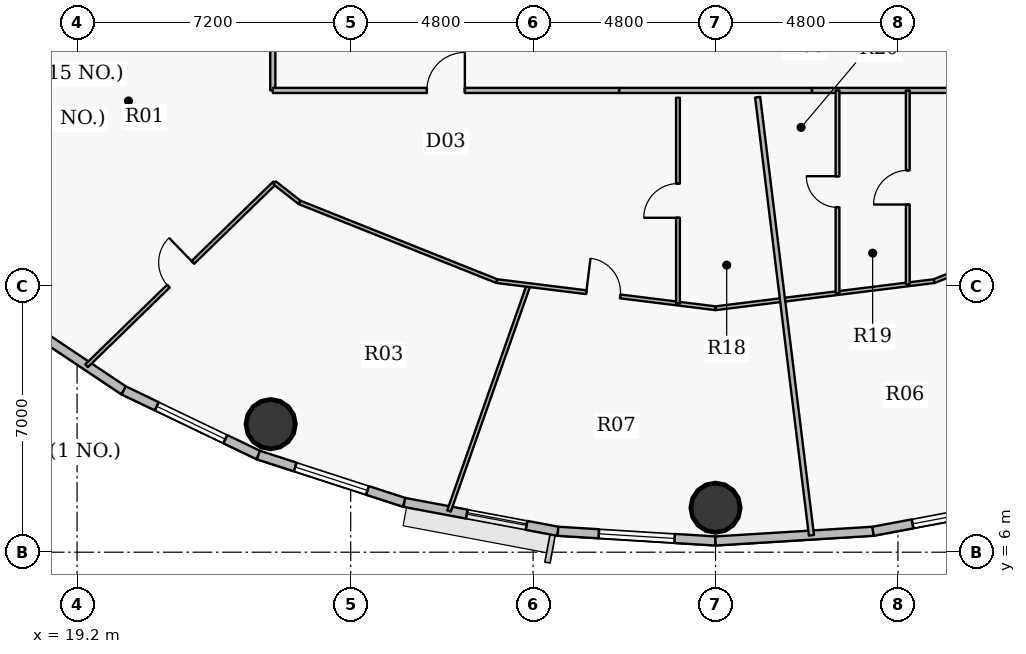
"""IFC4 building model, lengths in metres.
Left out: names, types, materials, properties, quantities, classifications, styles, units other than length and angle.
Written with IfcOpenShell. Run it as: python <this file> out.ifc"""

import sys

from ifc_helpers import new_model, si_unit, direction, frame, frame_2d, origin, origin_2d, place, context, subcontext, project, spatial, rectangle, hollow_circle, extrude, source, transform, mapped, element, fill, save


model = new_model("IFC4")
c1 = context("Model", 3, precision=1e-05, world=origin(), true_north=direction((0.0, 1.0)))
c2 = subcontext(c1, "Body", "Model", "MODEL_VIEW")
j1 = project(units=[si_unit("LENGTHUNIT", "METRE"), si_unit("PLANEANGLEUNIT", "RADIAN")], contexts=[c1])
p1 = place(None, origin())
s1 = spatial("IfcSite", under=j1, at=p1, CompositionType="ELEMENT")
p2 = place(p1, origin())
s2 = spatial("IfcBuilding", under=s1, at=p2, CompositionType="ELEMENT")
p3 = place(p2, frame((0.0, 0.0, 167.4)))
s3 = spatial("IfcBuildingStorey", under=s2, at=p3, CompositionType="ELEMENT", Elevation=167.4)
for number, where, z_axis, x_axis in (
    (1, (24.294, 9.369, 0.0), (0.0, 0.0, 1.0), (1.0, 0.0, 0.0)),
    (2, (36.0, 7.17, 0.0), (0.0, 0.0, 1.0), (1.0, 0.0, 0.0)),
):
    element("IfcColumn", number, at=place(p3, frame(where, z_axis=z_axis, x_axis=x_axis)), inside=s3, PredefinedType="COLUMN", context=c2, shape_type="SweptSolid", body=[
        extrude(hollow_circle(Radius=0.65, WallThickness=0.04, at=origin_2d()), origin(), (0.0, 0.0, 1.0), 3.75),
    ])
p4 = place(p3, frame((20.427, 10.257, 0.0), z_axis=(0.0, 0.0, 1.0), x_axis=(-0.831228998277, 0.555930168657, 0.0)))
e3 = element("IfcWall", 3, at=p4, inside=s3, PredefinedType="SOLIDWALL", context=c2, shape_type="SweptSolid", body=[
    extrude(rectangle(XDim=3.8, YDim=0.24, at=frame_2d((1.9, 0.0))), origin(), (0.0, 0.0, 1.0), 3.5),
])
p5 = place(p3, frame((23.97, 8.556, 0.0), z_axis=(0.0, 0.0, 1.0), x_axis=(-0.901564733809, 0.432644231155, 0.0)))
e4 = element("IfcWall", 4, at=p5, inside=s3, PredefinedType="SOLIDWALL", context=c2, shape_type="SweptSolid", body=[
    extrude(rectangle(XDim=3.93, YDim=0.24, at=frame_2d((1.965, 0.0))), origin(), (0.0, 0.0, 1.0), 3.5),
])
p6 = place(p5, frame((0.965, 0.0, 0.9)))
e5 = element("IfcOpeningElement", 5, at=p6, cuts=e4, PredefinedType="OPENING", context=c2, shape_type="SweptSolid", body=[
    extrude(rectangle(XDim=2.0, YDim=1.75, at=origin_2d()), frame((1.0, 0.13, 0.875), z_axis=(0.0, -1.0, 0.0), x_axis=(1.0, 0.0, 0.0)), (0.0, 0.0, 1.0), 0.26),
])
p7 = place(p3, frame((27.811, 7.311, 0.0), z_axis=(0.0, 0.0, 1.0), x_axis=(-0.951209870236, 0.30854462038, 0.0)))
e6 = element("IfcWall", 6, at=p7, inside=s3, PredefinedType="SOLIDWALL", context=c2, shape_type="SweptSolid", body=[
    extrude(rectangle(XDim=4.038, YDim=0.24, at=frame_2d((2.019, 0.0))), origin(), (0.0, 0.0, 1.0), 3.5),
])
p8 = place(p7, frame((1.019, 0.0, 0.9)))
e7 = element("IfcOpeningElement", 7, at=p8, cuts=e6, PredefinedType="OPENING", context=c2, shape_type="SweptSolid", body=[
    extrude(rectangle(XDim=2.0, YDim=1.75, at=origin_2d()), frame((1.0, 0.13, 0.875), z_axis=(0.0, -1.0, 0.0), x_axis=(1.0, 0.0, 0.0)), (0.0, 0.0, 1.0), 0.26),
])
p9 = place(p3, frame((31.854, 6.551, 0.0), z_axis=(0.0, 0.0, 1.0), x_axis=(-0.982788108205, 0.184736391573, 0.0)))
e8 = element("IfcWall", 8, at=p9, inside=s3, PredefinedType="SOLIDWALL", context=c2, shape_type="SweptSolid", body=[
    extrude(rectangle(XDim=4.114, YDim=0.24, at=frame_2d((2.057, 0.0))), origin(), (0.0, 0.0, 1.0), 3.5),
])
p10 = place(p9, frame((0.842, 0.0, 0.9)))
e9 = element("IfcOpeningElement", 9, at=p10, cuts=e8, PredefinedType="OPENING", context=c2, shape_type="SweptSolid", body=[
    extrude(rectangle(XDim=1.6, YDim=1.75, at=origin_2d()), frame((0.8, 0.13, 0.875), z_axis=(0.0, -1.0, 0.0), x_axis=(1.0, 0.0, 0.0)), (0.0, 0.0, 1.0), 0.26),
])
p11 = place(p3, frame((36.0, 6.295, 0.0), z_axis=(0.0, 0.0, 1.0), x_axis=(-0.998104600619, 0.061540281305, 0.0)))
e10 = element("IfcWall", 10, at=p11, inside=s3, PredefinedType="SOLIDWALL", context=c2, shape_type="SweptSolid", body=[
    extrude(rectangle(XDim=4.154, YDim=0.24, at=frame_2d((2.077, 0.0))), origin(), (0.0, 0.0, 1.0), 3.5),
])
p12 = place(p11, frame((1.077, 0.0, 0.9)))
e11 = element("IfcOpeningElement", 11, at=p12, cuts=e10, PredefinedType="OPENING", context=c2, shape_type="SweptSolid", body=[
    extrude(rectangle(XDim=2.0, YDim=1.75, at=origin_2d()), frame((1.0, 0.13, 0.875), z_axis=(0.0, -1.0, 0.0), x_axis=(1.0, 0.0, 0.0)), (0.0, 0.0, 1.0), 0.26),
])
p13 = place(p3, frame((40.146, 6.551, 0.0), z_axis=(0.0, 0.0, 1.0), x_axis=(-0.998104600619, -0.061540281305, 0.0)))
e12 = element("IfcWall", 12, at=p13, inside=s3, PredefinedType="SOLIDWALL", context=c2, shape_type="SweptSolid", body=[
    extrude(rectangle(XDim=4.154, YDim=0.24, at=frame_2d((2.077, 0.0))), origin(), (0.0, 0.0, 1.0), 3.5),
])
p14 = place(p3, frame((44.189, 7.311, 0.0), z_axis=(0.0, 0.0, 1.0), x_axis=(-0.982788108205, -0.184736391573, 0.0)))
e13 = element("IfcWall", 13, at=p14, inside=s3, PredefinedType="SOLIDWALL", context=c2, shape_type="SweptSolid", body=[
    extrude(rectangle(XDim=4.114, YDim=0.24, at=frame_2d((2.057, 0.0))), origin(), (0.0, 0.0, 1.0), 3.5),
])
p15 = place(p14, frame((1.057, 0.0, 0.9)))
e14 = element("IfcOpeningElement", 14, at=p15, cuts=e13, PredefinedType="OPENING", context=c2, shape_type="SweptSolid", body=[
    extrude(rectangle(XDim=2.0, YDim=1.75, at=origin_2d()), frame((1.0, 0.13, 0.875), z_axis=(0.0, -1.0, 0.0), x_axis=(1.0, 0.0, 0.0)), (0.0, 0.0, 1.0), 0.26),
])
p16 = place(p3, frame((19.449, 10.905, 0.0), z_axis=(0.0, 0.0, 1.0), x_axis=(0.716921274016, 0.697154134222, 0.0)))
e15 = element("IfcWall", 15, at=p16, inside=s3, PredefinedType="PARTITIONING", context=c2, shape_type="SweptSolid", body=[
    extrude(rectangle(XDim=6.904, YDim=0.1, at=frame_2d((3.452, 0.0))), origin(), (0.0, 0.0, 1.0), 2.935),
])
p17 = place(p16, frame((3.002, 0.0, 0.0)))
e16 = element("IfcOpeningElement", 16, at=p17, cuts=e15, PredefinedType="OPENING", context=c2, shape_type="SweptSolid", body=[
    extrude(rectangle(XDim=0.9, YDim=2.1, at=origin_2d()), frame((0.45, 0.06, 1.05), z_axis=(0.0, -1.0, 0.0), x_axis=(1.0, 0.0, 0.0)), (0.0, 0.0, 1.0), 0.12),
])
p18 = place(p3, frame((24.35, 18.15, 0.0), z_axis=(0.0, 0.0, 1.0), x_axis=(0.0, 1.0, 0.0)))
e17 = element("IfcWall", 17, at=p18, inside=s3, PredefinedType="PARTITIONING", context=c2, shape_type="SweptSolid", body=[
    extrude(rectangle(XDim=7.9, YDim=0.135, at=frame_2d((3.95, 0.0))), origin(), (0.0, 0.0, 1.0), 2.935),
])
p19 = place(p3, frame((24.35, 18.15, 0.0), z_axis=(0.0, 0.0, 1.0), x_axis=(1.0, 0.0, 0.0)))
e18 = element("IfcWall", 18, at=p19, inside=s3, PredefinedType="PARTITIONING", context=c2, shape_type="SweptSolid", body=[
    extrude(rectangle(XDim=9.109, YDim=0.135, at=frame_2d((4.554, 0.0))), origin(), (0.0, 0.0, 1.0), 2.935),
])
p20 = place(p19, frame((4.054, 0.0, 0.0)))
e19 = element("IfcOpeningElement", 19, at=p20, cuts=e18, PredefinedType="OPENING", context=c2, shape_type="SweptSolid", body=[
    extrude(rectangle(XDim=1.0, YDim=2.15, at=origin_2d()), frame((0.5, 0.078, 1.075), z_axis=(0.0, -1.0, 0.0), x_axis=(1.0, 0.0, 0.0)), (0.0, 0.0, 1.0), 0.155),
])
p21 = place(p3, frame((24.399, 15.718, 0.0), z_axis=(0.0, 0.0, 1.0), x_axis=(0.787251731647, -0.616631746684, 0.0)))
e20 = element("IfcWall", 20, at=p21, inside=s3, PredefinedType="PARTITIONING", context=c2, shape_type="SweptSolid", body=[
    extrude(rectangle(XDim=0.834, YDim=0.1, at=frame_2d((0.417, 0.0))), origin(), (0.0, 0.0, 1.0), 3.5),
])
p22 = place(p3, frame((25.055, 15.204, 0.0), z_axis=(0.0, 0.0, 1.0), x_axis=(0.928798710424, -0.370584613166, 0.0)))
e21 = element("IfcWall", 21, at=p22, inside=s3, PredefinedType="PARTITIONING", context=c2, shape_type="SweptSolid", body=[
    extrude(rectangle(XDim=5.589, YDim=0.1, at=frame_2d((2.794, 0.0))), origin(), (0.0, 0.0, 1.0), 2.935),
])
p23 = place(p3, frame((28.987, 7.084, 0.0), z_axis=(0.0, 0.0, 1.0), x_axis=(0.332161523942, 0.943222519882, 0.0)))
e22 = element("IfcWall", 22, at=p23, inside=s3, PredefinedType="PARTITIONING", context=c2, shape_type="SweptSolid", body=[
    extrude(rectangle(XDim=6.303, YDim=0.1, at=frame_2d((3.151, 0.0))), origin(), (0.0, 0.0, 1.0), 2.935),
])
p24 = place(p3, frame((30.246, 13.133, 0.0), z_axis=(0.0, 0.0, 1.0), x_axis=(0.992396615981, -0.123081097612, 0.0)))
e23 = element("IfcWall", 23, at=p24, inside=s3, PredefinedType="PARTITIONING", context=c2, shape_type="SweptSolid", body=[
    extrude(rectangle(XDim=5.798, YDim=0.1, at=frame_2d((2.899, 0.0))), origin(), (0.0, 0.0, 1.0), 2.935),
])
p25 = place(p24, frame((2.371, 0.0, 0.0)))
e24 = element("IfcOpeningElement", 24, at=p25, cuts=e23, PredefinedType="OPENING", context=c2, shape_type="SweptSolid", body=[
    extrude(rectangle(XDim=0.9, YDim=2.1, at=origin_2d()), frame((0.45, 0.06, 1.05), z_axis=(0.0, -1.0, 0.0), x_axis=(1.0, 0.0, 0.0)), (0.0, 0.0, 1.0), 0.12),
])
p26 = place(p3, frame((35.012, 12.542, 0.0), z_axis=(0.0, 0.0, 1.0), x_axis=(0.0, 1.0, 0.0)))
e25 = element("IfcWall", 25, at=p26, inside=s3, PredefinedType="PARTITIONING", context=c2, shape_type="SweptSolid", body=[
    extrude(rectangle(XDim=5.416, YDim=0.1, at=frame_2d((2.708, 0.0))), origin(), (0.0, 0.0, 1.0), 3.5),
])
p27 = place(p26, frame((2.258, 0.0, 0.0)))
e26 = element("IfcOpeningElement", 26, at=p27, cuts=e25, PredefinedType="OPENING", context=c2, shape_type="SweptSolid", body=[
    extrude(rectangle(XDim=0.9, YDim=2.1, at=origin_2d()), frame((0.45, 0.06, 1.05), z_axis=(0.0, -1.0, 0.0), x_axis=(1.0, 0.0, 0.0)), (0.0, 0.0, 1.0), 0.12),
])
p28 = place(p3, frame((36.0, 12.419, 0.0), z_axis=(0.0, 0.0, 1.0), x_axis=(0.992396615981, 0.123081097612, 0.0)))
e27 = element("IfcWall", 27, at=p28, inside=s3, PredefinedType="PARTITIONING", context=c2, shape_type="SweptSolid", body=[
    extrude(rectangle(XDim=5.798, YDim=0.1, at=frame_2d((2.899, 0.0))), origin(), (0.0, 0.0, 1.0), 2.935),
])
p29 = place(p3, frame((37.108, 17.972, 0.0), z_axis=(0.0, 0.0, 1.0), x_axis=(0.121868774407, -0.992546221505, 0.0)))
e28 = element("IfcWall", 28, at=p29, inside=s3, PredefinedType="PARTITIONING", context=c2, shape_type="SweptSolid", body=[
    extrude(rectangle(XDim=11.613, YDim=0.135, at=frame_2d((5.807, 0.0))), origin(), (0.0, 0.0, 1.0), 2.935),
])
p30 = place(p3, frame((38.541, 18.15, 0.0), z_axis=(0.0, 0.0, 1.0), x_axis=(1.0, 0.0, 0.0)))
e29 = element("IfcWall", 29, at=p30, inside=s3, PredefinedType="PARTITIONING", context=c2, shape_type="SweptSolid", body=[
    extrude(rectangle(XDim=9.659, YDim=0.135, at=frame_2d((4.829, 0.0))), origin(), (0.0, 0.0, 1.0), 2.935),
])
p31 = place(p30, frame((5.568, 0.0, 0.0)))
e30 = element("IfcOpeningElement", 30, at=p31, cuts=e29, PredefinedType="OPENING", context=c2, shape_type="SweptSolid", body=[
    extrude(rectangle(XDim=1.0, YDim=2.15, at=origin_2d()), frame((0.5, 0.078, 1.075), z_axis=(0.0, -1.0, 0.0), x_axis=(1.0, 0.0, 0.0)), (0.0, 0.0, 1.0), 0.155),
])
p32 = place(p3, frame((39.21, 12.817, 0.0), z_axis=(0.0, 0.0, 1.0), x_axis=(0.0, 1.0, 0.0)))
e31 = element("IfcWall", 31, at=p32, inside=s3, PredefinedType="PARTITIONING", context=c2, shape_type="SweptSolid", body=[
    extrude(rectangle(XDim=5.333, YDim=0.1, at=frame_2d((2.667, 0.0))), origin(), (0.0, 0.0, 1.0), 3.125),
])
p33 = place(p32, frame((2.256, 0.0, 0.0)))
e32 = element("IfcOpeningElement", 32, at=p33, cuts=e31, PredefinedType="OPENING", context=c2, shape_type="SweptSolid", body=[
    extrude(rectangle(XDim=0.82, YDim=2.1, at=origin_2d()), frame((0.41, 0.06, 1.05), z_axis=(0.0, -1.0, 0.0), x_axis=(1.0, 0.0, 0.0)), (0.0, 0.0, 1.0), 0.12),
])
p34 = place(p3, frame((41.059, 13.046, 0.0), z_axis=(0.0, 0.0, 1.0), x_axis=(0.0, 1.0, 0.0)))
e33 = element("IfcWall", 33, at=p34, inside=s3, PredefinedType="PARTITIONING", context=c2, shape_type="SweptSolid", body=[
    extrude(rectangle(XDim=5.104, YDim=0.1, at=frame_2d((2.552, 0.0))), origin(), (0.0, 0.0, 1.0), 2.935),
])
p35 = place(p34, frame((2.102, 0.0, 0.0)))
e34 = element("IfcOpeningElement", 34, at=p35, cuts=e33, PredefinedType="OPENING", context=c2, shape_type="SweptSolid", body=[
    extrude(rectangle(XDim=0.9, YDim=2.1, at=origin_2d()), frame((0.45, 0.06, 1.05), z_axis=(0.0, -1.0, 0.0), x_axis=(1.0, 0.0, 0.0)), (0.0, 0.0, 1.0), 0.12),
])
p36 = place(p3, frame((41.754, 13.133, 0.0), z_axis=(0.0, 0.0, 1.0), x_axis=(0.928798710424, 0.370584613166, 0.0)))
e35 = element("IfcWall", 35, at=p36, inside=s3, PredefinedType="PARTITIONING", context=c2, shape_type="SweptSolid", body=[
    extrude(rectangle(XDim=5.589, YDim=0.1, at=frame_2d((2.794, 0.0))), origin(), (0.0, 0.0, 1.0), 2.935),
])
p37 = place(p36, frame((1.015, 0.0, 0.0)))
e36 = element("IfcOpeningElement", 36, at=p37, cuts=e35, PredefinedType="OPENING", context=c2, shape_type="SweptSolid", body=[
    extrude(rectangle(XDim=0.9, YDim=2.1, at=origin_2d()), frame((0.45, 0.06, 1.05), z_axis=(0.0, -1.0, 0.0), x_axis=(1.0, 0.0, 0.0)), (0.0, 0.0, 1.0), 0.12),
])
p38 = place(p36, frame((3.769, 0.0, 0.0)))
e37 = element("IfcOpeningElement", 37, at=p38, cuts=e35, PredefinedType="OPENING", context=c2, shape_type="SweptSolid", body=[
    extrude(rectangle(XDim=0.9, YDim=2.1, at=origin_2d()), frame((0.45, 0.06, 1.05), z_axis=(0.0, -1.0, 0.0), x_axis=(1.0, 0.0, 0.0)), (0.0, 0.0, 1.0), 0.12),
])
p39 = place(p3, frame((38.531, 18.15, 0.0), z_axis=(0.0, 0.0, 1.0), x_axis=(-1.0, 0.0, 0.0)))
e38 = element("IfcWall", 38, at=p39, inside=s3, PredefinedType="PARTITIONING", context=c2, shape_type="SweptSolid", body=[
    extrude(rectangle(XDim=5.062, YDim=0.135, at=frame_2d((2.531, 0.0))), origin(), (0.0, 0.0, 1.0), 2.935),
])
m1 = source(origin(), c2, "Body", "SweptSolid", [
    extrude(rectangle(XDim=2.0, YDim=1.75, at=origin_2d()), frame((1.0, 0.03, 0.875), z_axis=(0.0, -1.0, 0.0), x_axis=(1.0, 0.0, 0.0)), (0.0, 0.0, 1.0), 0.06),
])
p40 = place(p6, origin())
e39 = element("IfcWindow", 39, at=p40, inside=s3, PartitioningType="DOUBLE_PANEL_VERTICAL", PredefinedType="WINDOW", context=c2, shape_type="MappedRepresentation", body=[
    mapped(m1, transform((0.0, 0.0, 0.0), x_axis=(1.0, 0.0, 0.0), y_axis=(0.0, 1.0, 0.0), z_axis=(0.0, 0.0, 1.0), scale=1.0)),
])
fill(e5, e39)
p41 = place(p8, origin())
e40 = element("IfcWindow", 40, at=p41, inside=s3, PartitioningType="DOUBLE_PANEL_VERTICAL", PredefinedType="WINDOW", context=c2, shape_type="MappedRepresentation", body=[
    mapped(m1, transform((0.0, 0.0, 0.0), x_axis=(1.0, 0.0, 0.0), y_axis=(0.0, 1.0, 0.0), z_axis=(0.0, 0.0, 1.0), scale=1.0)),
])
fill(e7, e40)
m2 = source(origin(), c2, "Body", "SweptSolid", [
    extrude(rectangle(XDim=1.6, YDim=1.75, at=origin_2d()), frame((0.8, 0.03, 0.875), z_axis=(0.0, -1.0, 0.0), x_axis=(1.0, 0.0, 0.0)), (0.0, 0.0, 1.0), 0.06),
])
p42 = place(p10, origin())
e41 = element("IfcWindow", 41, at=p42, inside=s3, PartitioningType="DOUBLE_PANEL_VERTICAL", PredefinedType="WINDOW", context=c2, shape_type="MappedRepresentation", body=[
    mapped(m2, transform((0.0, 0.0, 0.0), x_axis=(1.0, 0.0, 0.0), y_axis=(0.0, 1.0, 0.0), z_axis=(0.0, 0.0, 1.0), scale=1.0)),
])
fill(e9, e41)
p43 = place(p12, origin())
e42 = element("IfcWindow", 42, at=p43, inside=s3, PartitioningType="DOUBLE_PANEL_VERTICAL", PredefinedType="WINDOW", context=c2, shape_type="MappedRepresentation", body=[
    mapped(m1, transform((0.0, 0.0, 0.0), x_axis=(1.0, 0.0, 0.0), y_axis=(0.0, 1.0, 0.0), z_axis=(0.0, 0.0, 1.0), scale=1.0)),
])
fill(e11, e42)
p44 = place(p15, origin())
e43 = element("IfcWindow", 43, at=p44, inside=s3, PartitioningType="DOUBLE_PANEL_VERTICAL", PredefinedType="WINDOW", context=c2, shape_type="MappedRepresentation", body=[
    mapped(m1, transform((0.0, 0.0, 0.0), x_axis=(1.0, 0.0, 0.0), y_axis=(0.0, 1.0, 0.0), z_axis=(0.0, 0.0, 1.0), scale=1.0)),
])
fill(e14, e43)
m3 = source(origin(), c2, "Body", "SweptSolid", [
    extrude(rectangle(XDim=1.0, YDim=2.15, at=origin_2d()), frame((0.5, 0.025, 1.075), z_axis=(0.0, -1.0, 0.0), x_axis=(1.0, 0.0, 0.0)), (0.0, 0.0, 1.0), 0.05),
])
p45 = place(p20, origin())
e44 = element("IfcDoor", 44, at=p45, inside=s3, OperationType="SINGLE_SWING_RIGHT", PredefinedType="DOOR", context=c2, shape_type="MappedRepresentation", body=[
    mapped(m3, transform((0.0, 0.0, 0.0), x_axis=(1.0, 0.0, 0.0), y_axis=(0.0, 1.0, 0.0), z_axis=(0.0, 0.0, 1.0), scale=1.0)),
])
fill(e19, e44)
m4 = source(origin(), c2, "Body", "SweptSolid", [
    extrude(rectangle(XDim=0.9, YDim=2.1, at=origin_2d()), frame((0.45, 0.025, 1.05), z_axis=(0.0, -1.0, 0.0), x_axis=(1.0, 0.0, 0.0)), (0.0, 0.0, 1.0), 0.05),
])
p46 = place(p17, origin())
e45 = element("IfcDoor", 45, at=p46, inside=s3, OperationType="SINGLE_SWING_RIGHT", PredefinedType="DOOR", context=c2, shape_type="MappedRepresentation", body=[
    mapped(m4, transform((0.0, 0.0, 0.0), x_axis=(1.0, 0.0, 0.0), y_axis=(0.0, 1.0, 0.0), z_axis=(0.0, 0.0, 1.0), scale=1.0)),
])
fill(e16, e45)
p47 = place(p25, origin())
e46 = element("IfcDoor", 46, at=p47, inside=s3, OperationType="SINGLE_SWING_LEFT", PredefinedType="DOOR", context=c2, shape_type="MappedRepresentation", body=[
    mapped(m4, transform((0.0, 0.0, 0.0), x_axis=(1.0, 0.0, 0.0), y_axis=(0.0, 1.0, 0.0), z_axis=(0.0, 0.0, 1.0), scale=1.0)),
])
fill(e24, e46)
p48 = place(p27, origin())
e47 = element("IfcDoor", 47, at=p48, inside=s3, OperationType="SINGLE_SWING_LEFT", PredefinedType="DOOR", context=c2, shape_type="MappedRepresentation", body=[
    mapped(m4, transform((0.0, 0.0, 0.0), x_axis=(1.0, 0.0, 0.0), y_axis=(0.0, 1.0, 0.0), z_axis=(0.0, 0.0, 1.0), scale=1.0)),
])
fill(e26, e47)
p49 = place(p35, origin())
e48 = element("IfcDoor", 48, at=p49, inside=s3, OperationType="SINGLE_SWING_LEFT", PredefinedType="DOOR", context=c2, shape_type="MappedRepresentation", body=[
    mapped(m4, transform((0.0, 0.0, 0.0), x_axis=(1.0, 0.0, 0.0), y_axis=(0.0, 1.0, 0.0), z_axis=(0.0, 0.0, 1.0), scale=1.0)),
])
fill(e34, e48)
m5 = source(origin(), c2, "Body", "SweptSolid", [
    extrude(rectangle(XDim=0.82, YDim=2.1, at=origin_2d()), frame((0.41, 0.025, 1.05), z_axis=(0.0, -1.0, 0.0), x_axis=(1.0, 0.0, 0.0)), (0.0, 0.0, 1.0), 0.05),
])
p50 = place(p33, origin())
e49 = element("IfcDoor", 49, at=p50, inside=s3, OperationType="SINGLE_SWING_RIGHT", PredefinedType="DOOR", context=c2, shape_type="MappedRepresentation", body=[
    mapped(m5, transform((0.0, 0.0, 0.0), x_axis=(1.0, 0.0, 0.0), y_axis=(0.0, 1.0, 0.0), z_axis=(0.0, 0.0, 1.0), scale=1.0)),
])
fill(e32, e49)
save(model, sys.argv[1])
